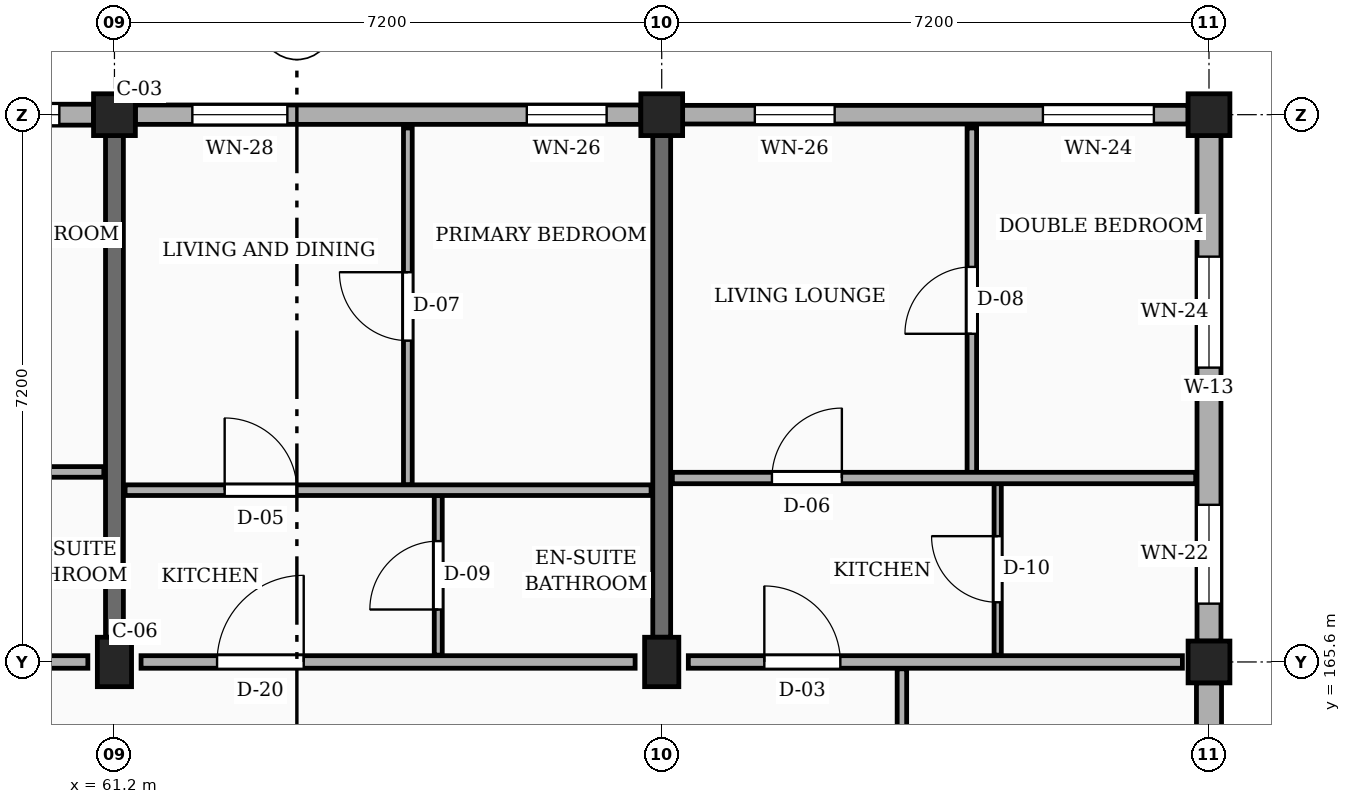
"""IFC4 building model, lengths in metres.
Left out: names, types, materials, properties, quantities, classifications, styles, units other than length and angle.
Written with IfcOpenShell. Run it as: python <this file> out.ifc"""

import sys

from ifc_helpers import new_model, si_unit, direction, frame, frame_2d, origin, origin_2d, place, context, subcontext, project, spatial, rectangle, extrude, element, fill, save


model = new_model("IFC4")
c1 = context("Model", 3, precision=1e-05, world=origin(), true_north=direction((0.0, 1.0)))
c2 = subcontext(c1, "Body", "Model", "MODEL_VIEW")
j1 = project(units=[si_unit("LENGTHUNIT", "METRE"), si_unit("PLANEANGLEUNIT", "RADIAN")], contexts=[c1])
p1 = place(None, origin())
s1 = spatial("IfcSite", under=j1, at=p1, CompositionType="ELEMENT")
p2 = place(p1, origin())
s2 = spatial("IfcBuilding", under=s1, at=p2, CompositionType="ELEMENT")
p3 = place(p2, frame((0.0, 0.0, 17.1)))
s3 = spatial("IfcBuildingStorey", under=s2, at=p3, CompositionType="ELEMENT", Elevation=17.1)
p4 = place(p3, frame((61.2, 165.6, 0.0), z_axis=(0.0, 0.0, 1.0), x_axis=(1.0, 0.0, 0.0)))
e1 = element("IfcColumn", 1, at=p4, inside=s3, PredefinedType="COLUMN", context=c2, shape_type="SweptSolid", body=[
    extrude(rectangle(XDim=0.45, YDim=0.65, at=origin_2d()), origin(), (0.0, 0.0, 1.0), 3.15),
])
p5 = place(p3, frame((61.2, 172.8, 0.0), z_axis=(0.0, 0.0, 1.0), x_axis=(1.0, 0.0, 0.0)))
e2 = element("IfcColumn", 2, at=p5, inside=s3, PredefinedType="COLUMN", context=c2, shape_type="SweptSolid", body=[
    extrude(rectangle(XDim=0.55, YDim=0.55, at=origin_2d()), origin(), (0.0, 0.0, 1.0), 3.15),
])
p6 = place(p3, frame((68.4, 165.6, 0.0), z_axis=(0.0, 0.0, 1.0), x_axis=(1.0, 0.0, 0.0)))
e3 = element("IfcColumn", 3, at=p6, inside=s3, PredefinedType="COLUMN", context=c2, shape_type="SweptSolid", body=[
    extrude(rectangle(XDim=0.45, YDim=0.65, at=origin_2d()), origin(), (0.0, 0.0, 1.0), 3.15),
])
for number, where, z_axis, x_axis in (
    (4, (68.4, 172.8, 0.0), (0.0, 0.0, 1.0), (1.0, 0.0, 0.0)),
    (5, (75.6, 165.6, 0.0), (0.0, 0.0, 1.0), (1.0, 0.0, 0.0)),
    (6, (75.6, 172.8, 0.0), (0.0, 0.0, 1.0), (1.0, 0.0, 0.0)),
):
    element("IfcColumn", number, at=place(p3, frame(where, z_axis=z_axis, x_axis=x_axis)), inside=s3, PredefinedType="COLUMN", context=c2, shape_type="SweptSolid", body=[
        extrude(rectangle(XDim=0.55, YDim=0.55, at=origin_2d()), origin(), (0.0, 0.0, 1.0), 3.15),
    ])
for number, where, z_axis, x_axis in (
    (7, (61.2, 165.925, 0.0), (0.0, 0.0, 1.0), (0.0, 1.0, 0.0)),
    (8, (68.4, 165.925, 0.0), (0.0, 0.0, 1.0), (0.0, 1.0, 0.0)),
):
    element("IfcWall", number, at=place(p3, frame(where, z_axis=z_axis, x_axis=x_axis)), inside=s3, PredefinedType="SOLIDWALL", context=c2, shape_type="SweptSolid", body=[
        extrude(rectangle(XDim=6.6, YDim=0.235, at=frame_2d((3.3, 0.0))), origin(), (0.0, 0.0, 1.0), 2.185),
    ])
p7 = place(p3, frame((75.6, 158.675, 0.0), z_axis=(0.0, 0.0, 1.0), x_axis=(0.0, 1.0, 0.0)))
e9 = element("IfcWall", 9, at=p7, inside=s3, PredefinedType="SOLIDWALL", context=c2, shape_type="SweptSolid", body=[
    extrude(rectangle(XDim=6.65, YDim=0.33, at=frame_2d((3.325, 0.0))), origin(), (0.0, 0.0, 1.0), 2.455),
])
p8 = place(p7, frame((0.45, 0.0, 0.78)))
e10 = element("IfcOpeningElement", 10, at=p8, cuts=e9, PredefinedType="OPENING", context=c2, shape_type="SweptSolid", body=[
    extrude(rectangle(XDim=1.14, YDim=1.36, at=frame_2d((0.57, 0.68))), frame((0.0, 0.175, 0.0), z_axis=(0.0, -1.0, 0.0), x_axis=(1.0, 0.0, 0.0)), (0.0, 0.0, 1.0), 0.35),
])
p9 = place(p7, frame((4.65, 0.0, 0.78)))
e11 = element("IfcOpeningElement", 11, at=p9, cuts=e9, PredefinedType="OPENING", context=c2, shape_type="SweptSolid", body=[
    extrude(rectangle(XDim=1.3, YDim=1.36, at=frame_2d((0.65, 0.68))), frame((0.0, 0.175, 0.0), z_axis=(0.0, -1.0, 0.0), x_axis=(1.0, 0.0, 0.0)), (0.0, 0.0, 1.0), 0.35),
])
p10 = place(p3, frame((75.6, 165.875, 0.0), z_axis=(0.0, 0.0, 1.0), x_axis=(0.0, 1.0, 0.0)))
e12 = element("IfcWall", 12, at=p10, inside=s3, PredefinedType="SOLIDWALL", context=c2, shape_type="SweptSolid", body=[
    extrude(rectangle(XDim=6.65, YDim=0.315, at=frame_2d((3.325, 0.0))), origin(), (0.0, 0.0, 1.0), 2.455),
])
p11 = place(p10, frame((0.492, 0.0, 0.78)))
e13 = element("IfcOpeningElement", 13, at=p11, cuts=e12, PredefinedType="OPENING", context=c2, shape_type="SweptSolid", body=[
    extrude(rectangle(XDim=1.3, YDim=1.36, at=frame_2d((0.65, 0.68))), frame((0.0, 0.167, 0.0), z_axis=(0.0, -1.0, 0.0), x_axis=(1.0, 0.0, 0.0)), (0.0, 0.0, 1.0), 0.335),
])
p12 = place(p10, frame((3.597, 0.0, 0.78)))
e14 = element("IfcOpeningElement", 14, at=p12, cuts=e12, PredefinedType="OPENING", context=c2, shape_type="SweptSolid", body=[
    extrude(rectangle(XDim=1.46, YDim=1.36, at=frame_2d((0.73, 0.68))), frame((0.0, 0.167, 0.0), z_axis=(0.0, -1.0, 0.0), x_axis=(1.0, 0.0, 0.0)), (0.0, 0.0, 1.0), 0.335),
])
p13 = place(p3, frame((75.325, 172.8, 0.0), z_axis=(0.0, 0.0, 1.0), x_axis=(-1.0, 0.0, 0.0)))
e15 = element("IfcWall", 15, at=p13, inside=s3, PredefinedType="SOLIDWALL", context=c2, shape_type="SweptSolid", body=[
    extrude(rectangle(XDim=6.65, YDim=0.245, at=frame_2d((3.325, 0.0))), origin(), (0.0, 0.0, 1.0), 2.455),
])
p14 = place(p13, frame((0.45, 0.0, 0.78)))
e16 = element("IfcOpeningElement", 16, at=p14, cuts=e15, PredefinedType="OPENING", context=c2, shape_type="SweptSolid", body=[
    extrude(rectangle(XDim=1.46, YDim=1.36, at=frame_2d((0.73, 0.68))), frame((0.0, 0.133, 0.0), z_axis=(0.0, -1.0, 0.0), x_axis=(1.0, 0.0, 0.0)), (0.0, 0.0, 1.0), 0.265),
])
p15 = place(p13, frame((4.65, 0.0, 0.78)))
e17 = element("IfcOpeningElement", 17, at=p15, cuts=e15, PredefinedType="OPENING", context=c2, shape_type="SweptSolid", body=[
    extrude(rectangle(XDim=1.05, YDim=1.44, at=frame_2d((0.525, 0.72))), frame((0.0, 0.133, 0.0), z_axis=(0.0, -1.0, 0.0), x_axis=(1.0, 0.0, 0.0)), (0.0, 0.0, 1.0), 0.265),
])
p16 = place(p3, frame((68.125, 172.8, 0.0), z_axis=(0.0, 0.0, 1.0), x_axis=(-1.0, 0.0, 0.0)))
e18 = element("IfcWall", 18, at=p16, inside=s3, PredefinedType="SOLIDWALL", context=c2, shape_type="SweptSolid", body=[
    extrude(rectangle(XDim=6.65, YDim=0.255, at=frame_2d((3.325, 0.0))), origin(), (0.0, 0.0, 1.0), 2.455),
])
p17 = place(p16, frame((0.45, 0.0, 0.78)))
e19 = element("IfcOpeningElement", 19, at=p17, cuts=e18, PredefinedType="OPENING", context=c2, shape_type="SweptSolid", body=[
    extrude(rectangle(XDim=1.05, YDim=1.44, at=frame_2d((0.525, 0.72))), frame((0.0, 0.137, 0.0), z_axis=(0.0, -1.0, 0.0), x_axis=(1.0, 0.0, 0.0)), (0.0, 0.0, 1.0), 0.275),
])
p18 = place(p16, frame((4.65, 0.0, 0.78)))
e20 = element("IfcOpeningElement", 20, at=p18, cuts=e18, PredefinedType="OPENING", context=c2, shape_type="SweptSolid", body=[
    extrude(rectangle(XDim=1.25, YDim=1.44, at=frame_2d((0.625, 0.72))), frame((0.0, 0.137, 0.0), z_axis=(0.0, -1.0, 0.0), x_axis=(1.0, 0.0, 0.0)), (0.0, 0.0, 1.0), 0.275),
])
p19 = place(p3, frame((60.925, 172.8, 0.0), z_axis=(0.0, 0.0, 1.0), x_axis=(-1.0, 0.0, 0.0)))
e21 = element("IfcWall", 21, at=p19, inside=s3, PredefinedType="SOLIDWALL", context=c2, shape_type="SweptSolid", body=[
    extrude(rectangle(XDim=6.65, YDim=0.275, at=frame_2d((3.325, 0.0))), origin(), (0.0, 0.0, 1.0), 2.455),
])
p20 = place(p19, frame((0.45, 0.0, 0.78)))
e22 = element("IfcOpeningElement", 22, at=p20, cuts=e21, PredefinedType="OPENING", context=c2, shape_type="SweptSolid", body=[
    extrude(rectangle(XDim=1.25, YDim=1.44, at=frame_2d((0.625, 0.72))), frame((0.0, 0.147, 0.0), z_axis=(0.0, -1.0, 0.0), x_axis=(1.0, 0.0, 0.0)), (0.0, 0.0, 1.0), 0.295),
])
p21 = place(p19, frame((4.65, 0.0, 0.78)))
e23 = element("IfcOpeningElement", 23, at=p21, cuts=e21, PredefinedType="OPENING", context=c2, shape_type="SweptSolid", body=[
    extrude(rectangle(XDim=1.45, YDim=1.44, at=frame_2d((0.725, 0.72))), frame((0.0, 0.147, 0.0), z_axis=(0.0, -1.0, 0.0), x_axis=(1.0, 0.0, 0.0)), (0.0, 0.0, 1.0), 0.295),
])
p22 = place(p3, frame((54.35, 165.6, 0.0), z_axis=(0.0, 0.0, 1.0), x_axis=(1.0, 0.0, 0.0)))
e24 = element("IfcWall", 24, at=p22, inside=s3, PredefinedType="PARTITIONING", context=c2, shape_type="SweptSolid", body=[
    extrude(rectangle(XDim=6.5, YDim=0.165, at=frame_2d((3.25, 0.0))), origin(), (0.0, 0.0, 1.0), 2.235),
])
p23 = place(p22, frame((1.0, 0.0, 0.0)))
e25 = element("IfcOpeningElement", 25, at=p23, cuts=e24, PredefinedType="OPENING", context=c2, shape_type="SweptSolid", body=[
    extrude(rectangle(XDim=0.94, YDim=2.12, at=frame_2d((0.47, 1.06))), frame((0.0, 0.093, 0.0), z_axis=(0.0, -1.0, 0.0), x_axis=(1.0, 0.0, 0.0)), (0.0, 0.0, 1.0), 0.185),
])
p24 = place(p3, frame((61.55, 165.6, 0.0), z_axis=(0.0, 0.0, 1.0), x_axis=(1.0, 0.0, 0.0)))
e26 = element("IfcWall", 26, at=p24, inside=s3, PredefinedType="PARTITIONING", context=c2, shape_type="SweptSolid", body=[
    extrude(rectangle(XDim=6.5, YDim=0.165, at=frame_2d((3.25, 0.0))), origin(), (0.0, 0.0, 1.0), 2.235),
])
p25 = place(p24, frame((1.0, 0.0, 0.0)))
e27 = element("IfcOpeningElement", 27, at=p25, cuts=e26, PredefinedType="OPENING", context=c2, shape_type="SweptSolid", body=[
    extrude(rectangle(XDim=1.14, YDim=2.18, at=frame_2d((0.57, 1.09))), frame((0.0, 0.093, 0.0), z_axis=(0.0, -1.0, 0.0), x_axis=(1.0, 0.0, 0.0)), (0.0, 0.0, 1.0), 0.185),
])
p26 = place(p3, frame((68.75, 165.6, 0.0), z_axis=(0.0, 0.0, 1.0), x_axis=(1.0, 0.0, 0.0)))
e28 = element("IfcWall", 28, at=p26, inside=s3, PredefinedType="PARTITIONING", context=c2, shape_type="SweptSolid", body=[
    extrude(rectangle(XDim=6.5, YDim=0.165, at=frame_2d((3.25, 0.0))), origin(), (0.0, 0.0, 1.0), 2.235),
])
p27 = place(p26, frame((1.0, 0.0, 0.0)))
e29 = element("IfcOpeningElement", 29, at=p27, cuts=e28, PredefinedType="OPENING", context=c2, shape_type="SweptSolid", body=[
    extrude(rectangle(XDim=1.0, YDim=2.15, at=frame_2d((0.5, 1.075))), frame((0.0, 0.093, 0.0), z_axis=(0.0, -1.0, 0.0), x_axis=(1.0, 0.0, 0.0)), (0.0, 0.0, 1.0), 0.185),
])
p28 = place(p3, frame((54.14, 168.1, 0.0), z_axis=(0.0, 0.0, 1.0), x_axis=(1.0, 0.0, 0.0)))
e30 = element("IfcWall", 30, at=p28, inside=s3, PredefinedType="PARTITIONING", context=c2, shape_type="SweptSolid", body=[
    extrude(rectangle(XDim=6.92, YDim=0.14, at=frame_2d((3.46, 0.0))), origin(), (0.0, 0.0, 1.0), 2.32),
])
p29 = place(p28, frame((1.31, 0.0, 0.0)))
e31 = element("IfcOpeningElement", 31, at=p29, cuts=e30, PredefinedType="OPENING", context=c2, shape_type="SweptSolid", body=[
    extrude(rectangle(XDim=0.95, YDim=2.1, at=frame_2d((0.475, 1.05))), frame((0.0, 0.08, 0.0), z_axis=(0.0, -1.0, 0.0), x_axis=(1.0, 0.0, 0.0)), (0.0, 0.0, 1.0), 0.16),
])
p30 = place(p3, frame((65.06, 167.93, 0.0), z_axis=(0.0, 0.0, 1.0), x_axis=(0.0, 1.0, 0.0)))
e32 = element("IfcWall", 32, at=p30, inside=s3, PredefinedType="PARTITIONING", context=c2, shape_type="SweptSolid", body=[
    extrude(rectangle(XDim=4.695, YDim=0.115, at=frame_2d((2.348, 0.0))), origin(), (0.0, 0.0, 1.0), 2.32),
])
p31 = place(p30, frame((1.897, 0.0, 0.0)))
e33 = element("IfcOpeningElement", 33, at=p31, cuts=e32, PredefinedType="OPENING", context=c2, shape_type="SweptSolid", body=[
    extrude(rectangle(XDim=0.9, YDim=2.1, at=frame_2d((0.45, 1.05))), frame((0.0, 0.067, 0.0), z_axis=(0.0, -1.0, 0.0), x_axis=(1.0, 0.0, 0.0)), (0.0, 0.0, 1.0), 0.135),
])
p32 = place(p3, frame((65.46, 165.69, 0.0), z_axis=(0.0, 0.0, 1.0), x_axis=(0.0, 1.0, 0.0)))
e34 = element("IfcWall", 34, at=p32, inside=s3, PredefinedType="PARTITIONING", context=c2, shape_type="SweptSolid", body=[
    extrude(rectangle(XDim=2.1, YDim=0.105, at=frame_2d((1.05, 0.0))), origin(), (0.0, 0.0, 1.0), 2.32),
])
p33 = place(p32, frame((0.6, 0.0, 0.0)))
e35 = element("IfcOpeningElement", 35, at=p33, cuts=e34, PredefinedType="OPENING", context=c2, shape_type="SweptSolid", body=[
    extrude(rectangle(XDim=0.9, YDim=2.05, at=frame_2d((0.45, 1.025))), frame((0.0, 0.062, 0.0), z_axis=(0.0, -1.0, 0.0), x_axis=(1.0, 0.0, 0.0)), (0.0, 0.0, 1.0), 0.125),
])
p34 = place(p3, frame((61.34, 167.86, 0.0), z_axis=(0.0, 0.0, 1.0), x_axis=(1.0, 0.0, 0.0)))
e36 = element("IfcWall", 36, at=p34, inside=s3, PredefinedType="PARTITIONING", context=c2, shape_type="SweptSolid", body=[
    extrude(rectangle(XDim=6.92, YDim=0.14, at=frame_2d((3.46, 0.0))), origin(), (0.0, 0.0, 1.0), 2.32),
])
p35 = place(p34, frame((1.31, 0.0, 0.0)))
e37 = element("IfcOpeningElement", 37, at=p35, cuts=e36, PredefinedType="OPENING", context=c2, shape_type="SweptSolid", body=[
    extrude(rectangle(XDim=0.95, YDim=2.1, at=frame_2d((0.475, 1.05))), frame((0.0, 0.08, 0.0), z_axis=(0.0, -1.0, 0.0), x_axis=(1.0, 0.0, 0.0)), (0.0, 0.0, 1.0), 0.16),
])
p36 = place(p3, frame((71.56, 158.49, 0.0), z_axis=(0.0, 0.0, 1.0), x_axis=(0.0, 1.0, 0.0)))
e38 = element("IfcWall", 38, at=p36, inside=s3, PredefinedType="PARTITIONING", context=c2, shape_type="SweptSolid", body=[
    extrude(rectangle(XDim=7.02, YDim=0.125, at=frame_2d((3.51, 0.0))), origin(), (0.0, 0.0, 1.0), 2.32),
])
p37 = place(p36, frame((2.85, 0.0, 0.0)))
e39 = element("IfcOpeningElement", 39, at=p37, cuts=e38, PredefinedType="OPENING", context=c2, shape_type="SweptSolid", body=[
    extrude(rectangle(XDim=1.02, YDim=2.15, at=frame_2d((0.51, 1.075))), frame((0.0, 0.073, 0.0), z_axis=(0.0, -1.0, 0.0), x_axis=(1.0, 0.0, 0.0)), (0.0, 0.0, 1.0), 0.145),
])
p38 = place(p3, frame((72.48, 168.09, 0.0), z_axis=(0.0, 0.0, 1.0), x_axis=(0.0, 1.0, 0.0)))
e40 = element("IfcWall", 40, at=p38, inside=s3, PredefinedType="PARTITIONING", context=c2, shape_type="SweptSolid", body=[
    extrude(rectangle(XDim=4.535, YDim=0.125, at=frame_2d((2.268, 0.0))), origin(), (0.0, 0.0, 1.0), 2.32),
])
p39 = place(p38, frame((1.827, 0.0, 0.0)))
e41 = element("IfcOpeningElement", 41, at=p39, cuts=e40, PredefinedType="OPENING", context=c2, shape_type="SweptSolid", body=[
    extrude(rectangle(XDim=0.88, YDim=2.08, at=frame_2d((0.44, 1.04))), frame((0.0, 0.073, 0.0), z_axis=(0.0, -1.0, 0.0), x_axis=(1.0, 0.0, 0.0)), (0.0, 0.0, 1.0), 0.145),
])
p40 = place(p3, frame((72.82, 165.69, 0.0), z_axis=(0.0, 0.0, 1.0), x_axis=(0.0, 1.0, 0.0)))
e42 = element("IfcWall", 42, at=p40, inside=s3, PredefinedType="PARTITIONING", context=c2, shape_type="SweptSolid", body=[
    extrude(rectangle(XDim=2.26, YDim=0.095, at=frame_2d((1.13, 0.0))), origin(), (0.0, 0.0, 1.0), 2.32),
])
p41 = place(p40, frame((0.695, 0.0, 0.0)))
e43 = element("IfcOpeningElement", 43, at=p41, cuts=e42, PredefinedType="OPENING", context=c2, shape_type="SweptSolid", body=[
    extrude(rectangle(XDim=0.87, YDim=2.05, at=frame_2d((0.435, 1.025))), frame((0.0, 0.058, 0.0), z_axis=(0.0, -1.0, 0.0), x_axis=(1.0, 0.0, 0.0)), (0.0, 0.0, 1.0), 0.115),
])
p42 = place(p3, frame((68.54, 168.02, 0.0), z_axis=(0.0, 0.0, 1.0), x_axis=(1.0, 0.0, 0.0)))
e44 = element("IfcWall", 44, at=p42, inside=s3, PredefinedType="PARTITIONING", context=c2, shape_type="SweptSolid", body=[
    extrude(rectangle(XDim=6.885, YDim=0.15, at=frame_2d((3.442, 0.0))), origin(), (0.0, 0.0, 1.0), 2.32),
])
p43 = place(p42, frame((1.31, 0.0, 0.0)))
e45 = element("IfcOpeningElement", 45, at=p43, cuts=e44, PredefinedType="OPENING", context=c2, shape_type="SweptSolid", body=[
    extrude(rectangle(XDim=0.92, YDim=2.1, at=frame_2d((0.46, 1.05))), frame((0.0, 0.085, 0.0), z_axis=(0.0, -1.0, 0.0), x_axis=(1.0, 0.0, 0.0)), (0.0, 0.0, 1.0), 0.17),
])
p44 = place(p11, origin())
e46 = element("IfcWindow", 46, at=p44, inside=s3, PartitioningType="SINGLE_PANEL", PredefinedType="WINDOW", context=c2, shape_type="SweptSolid", body=[
    extrude(rectangle(XDim=1.3, YDim=1.36, at=frame_2d((0.65, 0.68))), frame((0.0, 0.03, 0.0), z_axis=(0.0, -1.0, 0.0), x_axis=(1.0, 0.0, 0.0)), (0.0, 0.0, 1.0), 0.06),
])
fill(e13, e46)
p45 = place(p12, origin())
e47 = element("IfcWindow", 47, at=p45, inside=s3, PartitioningType="SINGLE_PANEL", PredefinedType="WINDOW", context=c2, shape_type="SweptSolid", body=[
    extrude(rectangle(XDim=1.46, YDim=1.36, at=frame_2d((0.73, 0.68))), frame((0.0, 0.03, 0.0), z_axis=(0.0, -1.0, 0.0), x_axis=(1.0, 0.0, 0.0)), (0.0, 0.0, 1.0), 0.06),
])
fill(e14, e47)
p46 = place(p14, origin())
e48 = element("IfcWindow", 48, at=p46, inside=s3, PartitioningType="SINGLE_PANEL", PredefinedType="WINDOW", context=c2, shape_type="SweptSolid", body=[
    extrude(rectangle(XDim=1.46, YDim=1.36, at=frame_2d((0.73, 0.68))), frame((0.0, 0.03, 0.0), z_axis=(0.0, -1.0, 0.0), x_axis=(1.0, 0.0, 0.0)), (0.0, 0.0, 1.0), 0.06),
])
fill(e16, e48)
p47 = place(p15, origin())
e49 = element("IfcWindow", 49, at=p47, inside=s3, PartitioningType="SINGLE_PANEL", PredefinedType="WINDOW", context=c2, shape_type="SweptSolid", body=[
    extrude(rectangle(XDim=1.05, YDim=1.44, at=frame_2d((0.525, 0.72))), frame((0.0, 0.03, 0.0), z_axis=(0.0, -1.0, 0.0), x_axis=(1.0, 0.0, 0.0)), (0.0, 0.0, 1.0), 0.06),
])
fill(e17, e49)
p48 = place(p17, origin())
e50 = element("IfcWindow", 50, at=p48, inside=s3, PartitioningType="SINGLE_PANEL", PredefinedType="WINDOW", context=c2, shape_type="SweptSolid", body=[
    extrude(rectangle(XDim=1.05, YDim=1.44, at=frame_2d((0.525, 0.72))), frame((0.0, 0.03, 0.0), z_axis=(0.0, -1.0, 0.0), x_axis=(1.0, 0.0, 0.0)), (0.0, 0.0, 1.0), 0.06),
])
fill(e19, e50)
p49 = place(p18, origin())
e51 = element("IfcWindow", 51, at=p49, inside=s3, PartitioningType="SINGLE_PANEL", PredefinedType="WINDOW", context=c2, shape_type="SweptSolid", body=[
    extrude(rectangle(XDim=1.25, YDim=1.44, at=frame_2d((0.625, 0.72))), frame((0.0, 0.03, 0.0), z_axis=(0.0, -1.0, 0.0), x_axis=(1.0, 0.0, 0.0)), (0.0, 0.0, 1.0), 0.06),
])
fill(e20, e51)
p50 = place(p20, origin())
e52 = element("IfcWindow", 52, at=p50, inside=s3, PartitioningType="SINGLE_PANEL", PredefinedType="WINDOW", context=c2, shape_type="SweptSolid", body=[
    extrude(rectangle(XDim=1.25, YDim=1.44, at=frame_2d((0.625, 0.72))), frame((0.0, 0.03, 0.0), z_axis=(0.0, -1.0, 0.0), x_axis=(1.0, 0.0, 0.0)), (0.0, 0.0, 1.0), 0.06),
])
fill(e22, e52)
p51 = place(p25, origin())
e53 = element("IfcDoor", 53, at=p51, inside=s3, OperationType="SINGLE_SWING_RIGHT", PredefinedType="DOOR", context=c2, shape_type="SweptSolid", body=[
    extrude(rectangle(XDim=1.14, YDim=2.18, at=frame_2d((0.57, 1.09))), frame((0.0, 0.025, 0.0), z_axis=(0.0, -1.0, 0.0), x_axis=(1.0, 0.0, 0.0)), (0.0, 0.0, 1.0), 0.05),
])
fill(e27, e53)
p52 = place(p27, origin())
e54 = element("IfcDoor", 54, at=p52, inside=s3, OperationType="SINGLE_SWING_LEFT", PredefinedType="DOOR", context=c2, shape_type="SweptSolid", body=[
    extrude(rectangle(XDim=1.0, YDim=2.15, at=frame_2d((0.5, 1.075))), frame((0.0, 0.025, 0.0), z_axis=(0.0, -1.0, 0.0), x_axis=(1.0, 0.0, 0.0)), (0.0, 0.0, 1.0), 0.05),
])
fill(e29, e54)
p53 = place(p31, origin())
e55 = element("IfcDoor", 55, at=p53, inside=s3, OperationType="SINGLE_SWING_RIGHT", PredefinedType="DOOR", context=c2, shape_type="SweptSolid", body=[
    extrude(rectangle(XDim=0.9, YDim=2.1, at=frame_2d((0.45, 1.05))), frame((0.0, 0.025, 0.0), z_axis=(0.0, -1.0, 0.0), x_axis=(1.0, 0.0, 0.0)), (0.0, 0.0, 1.0), 0.05),
])
fill(e33, e55)
p54 = place(p33, origin())
e56 = element("IfcDoor", 56, at=p54, inside=s3, OperationType="SINGLE_SWING_LEFT", PredefinedType="DOOR", context=c2, shape_type="SweptSolid", body=[
    extrude(rectangle(XDim=0.9, YDim=2.05, at=frame_2d((0.45, 1.025))), frame((0.0, 0.025, 0.0), z_axis=(0.0, -1.0, 0.0), x_axis=(1.0, 0.0, 0.0)), (0.0, 0.0, 1.0), 0.05),
])
fill(e35, e56)
p55 = place(p35, origin())
e57 = element("IfcDoor", 57, at=p55, inside=s3, OperationType="SINGLE_SWING_LEFT", PredefinedType="DOOR", context=c2, shape_type="SweptSolid", body=[
    extrude(rectangle(XDim=0.95, YDim=2.1, at=frame_2d((0.475, 1.05))), frame((0.0, 0.025, 0.0), z_axis=(0.0, -1.0, 0.0), x_axis=(1.0, 0.0, 0.0)), (0.0, 0.0, 1.0), 0.05),
])
fill(e37, e57)
p56 = place(p39, origin())
e58 = element("IfcDoor", 58, at=p56, inside=s3, OperationType="SINGLE_SWING_LEFT", PredefinedType="DOOR", context=c2, shape_type="SweptSolid", body=[
    extrude(rectangle(XDim=0.88, YDim=2.08, at=frame_2d((0.44, 1.04))), frame((0.0, 0.025, 0.0), z_axis=(0.0, -1.0, 0.0), x_axis=(1.0, 0.0, 0.0)), (0.0, 0.0, 1.0), 0.05),
])
fill(e41, e58)
p57 = place(p41, origin())
e59 = element("IfcDoor", 59, at=p57, inside=s3, OperationType="SINGLE_SWING_RIGHT", PredefinedType="DOOR", context=c2, shape_type="SweptSolid", body=[
    extrude(rectangle(XDim=0.87, YDim=2.05, at=frame_2d((0.435, 1.025))), frame((0.0, 0.025, 0.0), z_axis=(0.0, -1.0, 0.0), x_axis=(1.0, 0.0, 0.0)), (0.0, 0.0, 1.0), 0.05),
])
fill(e43, e59)
p58 = place(p43, origin())
e60 = element("IfcDoor", 60, at=p58, inside=s3, OperationType="SINGLE_SWING_RIGHT", PredefinedType="DOOR", context=c2, shape_type="SweptSolid", body=[
    extrude(rectangle(XDim=0.92, YDim=2.1, at=frame_2d((0.46, 1.05))), frame((0.0, 0.025, 0.0), z_axis=(0.0, -1.0, 0.0), x_axis=(1.0, 0.0, 0.0)), (0.0, 0.0, 1.0), 0.05),
])
fill(e45, e60)
save(model, sys.argv[1])
